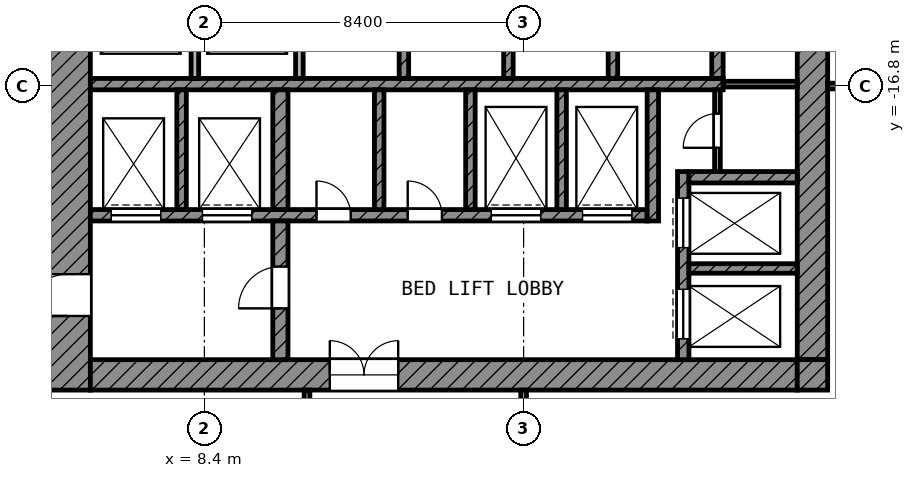
"""IFC4 building model, lengths in metres.
Left out: names, types, materials, properties, quantities, classifications, styles, units other than length and angle.
Written with IfcOpenShell. Run it as: python <this file> out.ifc"""

import sys

from ifc_helpers import new_model, si_unit, direction, frame, frame_2d, origin, place, context, subcontext, project, spatial, rectangle, extrude, element, fill, save


model = new_model("IFC4")
c1 = context("Model", 3, precision=1e-05, world=origin(), true_north=direction((0.0, 1.0)))
c2 = subcontext(c1, "Body", "Model", "MODEL_VIEW")
j1 = project(units=[si_unit("LENGTHUNIT", "METRE"), si_unit("PLANEANGLEUNIT", "RADIAN")], contexts=[c1])
p1 = place(None, origin())
s1 = spatial("IfcSite", under=j1, at=p1, CompositionType="ELEMENT")
p2 = place(p1, origin())
s2 = spatial("IfcBuilding", under=s1, at=p2, CompositionType="ELEMENT")
p3 = place(p2, frame((0.0, 0.0, 218.0)))
s3 = spatial("IfcBuildingStorey", under=s2, at=p3, CompositionType="ELEMENT", Elevation=218.0)
p4 = place(p3, frame((4.8, -24.8, 0.0), z_axis=(0.0, 0.0, 1.0), x_axis=(0.0, 1.0, 0.0)))
e1 = element("IfcWall", 1, at=p4, inside=s3, PredefinedType="SHEAR", context=c2, shape_type="SweptSolid", body=[
    extrude(rectangle(XDim=19.4, YDim=1.2, at=frame_2d((9.7, 0.0))), origin(), (0.0, 0.0, 1.0), 3.6),
])
p5 = place(p4, frame((11.25, 0.0, 0.0)))
e2 = element("IfcOpeningElement", 2, at=p5, cuts=e1, PredefinedType="OPENING", context=c2, shape_type="SweptSolid", body=[
    extrude(rectangle(XDim=1.1, YDim=2.1, at=frame_2d((0.55, 1.05))), frame((0.0, 0.61, 0.0), z_axis=(0.0, -1.0, 0.0), x_axis=(1.0, 0.0, 0.0)), (0.0, 0.0, 1.0), 1.22),
])
p6 = place(p4, frame((1.95, 0.0, 0.0)))
e3 = element("IfcOpeningElement", 3, at=p6, cuts=e1, PredefinedType="OPENING", context=c2, shape_type="SweptSolid", body=[
    extrude(rectangle(XDim=1.1, YDim=2.1, at=frame_2d((0.55, 1.05))), frame((0.0, 0.61, 0.0), z_axis=(0.0, -1.0, 0.0), x_axis=(1.0, 0.0, 0.0)), (0.0, 0.0, 1.0), 1.22),
])
p7 = place(p3, frame((24.4, -24.0, 0.0), z_axis=(0.0, 0.0, 1.0), x_axis=(0.0, 1.0, 0.0)))
e4 = element("IfcWall", 4, at=p7, inside=s3, PredefinedType="SHEAR", context=c2, shape_type="SweptSolid", body=[
    extrude(rectangle(XDim=18.6, YDim=0.8, at=frame_2d((9.3, 0.0))), origin(), (0.0, 0.0, 1.0), 3.6),
])
p8 = place(p7, frame((10.5, 0.0, 0.0)))
e5 = element("IfcOpeningElement", 5, at=p8, cuts=e4, PredefinedType="OPENING", context=c2, shape_type="SweptSolid", body=[
    extrude(rectangle(XDim=1.8, YDim=2.1, at=frame_2d((0.9, 1.05))), frame((0.0, 0.41, 0.0), z_axis=(0.0, -1.0, 0.0), x_axis=(1.0, 0.0, 0.0)), (0.0, 0.0, 1.0), 0.82),
])
p9 = place(p3, frame((5.4, -24.4, 0.0), z_axis=(0.0, 0.0, 1.0), x_axis=(1.0, 0.0, 0.0)))
e6 = element("IfcWall", 6, at=p9, inside=s3, PredefinedType="SHEAR", context=c2, shape_type="SweptSolid", body=[
    extrude(rectangle(XDim=18.6, YDim=0.8, at=frame_2d((9.3, 0.0))), origin(), (0.0, 0.0, 1.0), 3.6),
])
p10 = place(p9, frame((6.3, 0.0, 0.0)))
e7 = element("IfcOpeningElement", 7, at=p10, cuts=e6, PredefinedType="OPENING", context=c2, shape_type="SweptSolid", body=[
    extrude(rectangle(XDim=1.8, YDim=2.1, at=frame_2d((0.9, 1.05))), frame((0.0, 0.41, 0.0), z_axis=(0.0, -1.0, 0.0), x_axis=(1.0, 0.0, 0.0)), (0.0, 0.0, 1.0), 0.82),
])
p11 = place(p3, frame((24.4, -24.8, 0.0), z_axis=(0.0, 0.0, 1.0), x_axis=(0.0, 1.0, 0.0)))
e8 = element("IfcWall", 8, at=p11, inside=s3, PredefinedType="SHEAR", context=c2, shape_type="SweptSolid", body=[
    extrude(rectangle(XDim=0.8, YDim=0.8, at=frame_2d((0.4, 0.0))), origin(), (0.0, 0.0, 1.0), 3.6),
])
p12 = place(p3, frame((5.4, -16.75, 0.0), z_axis=(0.0, 0.0, 1.0), x_axis=(1.0, 0.0, 0.0)))
e9 = element("IfcWall", 9, at=p12, inside=s3, PredefinedType="SHEAR", context=c2, shape_type="SweptSolid", body=[
    extrude(rectangle(XDim=16.65, YDim=0.3, at=frame_2d((8.325, 0.0))), origin(), (0.0, 0.0, 1.0), 3.6),
])
p13 = place(p3, frame((5.4, -20.2, 0.0), z_axis=(0.0, 0.0, 1.0), x_axis=(1.0, 0.0, 0.0)))
e10 = element("IfcWall", 10, at=p13, inside=s3, PredefinedType="SHEAR", context=c2, shape_type="SweptSolid", body=[
    extrude(rectangle(XDim=14.65, YDim=0.3, at=frame_2d((7.325, 0.0))), origin(), (0.0, 0.0, 1.0), 3.6),
])
p14 = place(p13, frame((10.55, 0.0, 0.0)))
e11 = element("IfcOpeningElement", 11, at=p14, cuts=e10, PredefinedType="OPENING", context=c2, shape_type="SweptSolid", body=[
    extrude(rectangle(XDim=1.3, YDim=2.1, at=frame_2d((0.65, 1.05))), frame((0.0, 0.16, 0.0), z_axis=(0.0, -1.0, 0.0), x_axis=(1.0, 0.0, 0.0)), (0.0, 0.0, 1.0), 0.32),
])
p15 = place(p13, frame((12.95, 0.0, 0.0)))
e12 = element("IfcOpeningElement", 12, at=p15, cuts=e10, PredefinedType="OPENING", context=c2, shape_type="SweptSolid", body=[
    extrude(rectangle(XDim=1.3, YDim=2.1, at=frame_2d((0.65, 1.05))), frame((0.0, 0.16, 0.0), z_axis=(0.0, -1.0, 0.0), x_axis=(1.0, 0.0, 0.0)), (0.0, 0.0, 1.0), 0.32),
])
p16 = place(p13, frame((0.55, 0.0, 0.0)))
e13 = element("IfcOpeningElement", 13, at=p16, cuts=e10, PredefinedType="OPENING", context=c2, shape_type="SweptSolid", body=[
    extrude(rectangle(XDim=1.3, YDim=2.1, at=frame_2d((0.65, 1.05))), frame((0.0, 0.16, 0.0), z_axis=(0.0, -1.0, 0.0), x_axis=(1.0, 0.0, 0.0)), (0.0, 0.0, 1.0), 0.32),
])
p17 = place(p13, frame((2.95, 0.0, 0.0)))
e14 = element("IfcOpeningElement", 14, at=p17, cuts=e10, PredefinedType="OPENING", context=c2, shape_type="SweptSolid", body=[
    extrude(rectangle(XDim=1.3, YDim=2.1, at=frame_2d((0.65, 1.05))), frame((0.0, 0.16, 0.0), z_axis=(0.0, -1.0, 0.0), x_axis=(1.0, 0.0, 0.0)), (0.0, 0.0, 1.0), 0.32),
])
p18 = place(p13, frame((5.95, 0.0, 0.0)))
e15 = element("IfcOpeningElement", 15, at=p18, cuts=e10, PredefinedType="OPENING", context=c2, shape_type="SweptSolid", body=[
    extrude(rectangle(XDim=0.9, YDim=2.1, at=frame_2d((0.45, 1.05))), frame((0.0, 0.16, 0.0), z_axis=(0.0, -1.0, 0.0), x_axis=(1.0, 0.0, 0.0)), (0.0, 0.0, 1.0), 0.32),
])
p19 = place(p13, frame((8.35, 0.0, 0.0)))
e16 = element("IfcOpeningElement", 16, at=p19, cuts=e10, PredefinedType="OPENING", context=c2, shape_type="SweptSolid", body=[
    extrude(rectangle(XDim=0.9, YDim=2.1, at=frame_2d((0.45, 1.05))), frame((0.0, 0.16, 0.0), z_axis=(0.0, -1.0, 0.0), x_axis=(1.0, 0.0, 0.0)), (0.0, 0.0, 1.0), 0.32),
])
p20 = place(p3, frame((10.4, -24.0, 0.0), z_axis=(0.0, 0.0, 1.0), x_axis=(0.0, 1.0, 0.0)))
e17 = element("IfcWall", 17, at=p20, inside=s3, PredefinedType="SHEAR", context=c2, shape_type="SweptSolid", body=[
    extrude(rectangle(XDim=3.65, YDim=0.4, at=frame_2d((1.825, 0.0))), origin(), (0.0, 0.0, 1.0), 3.6),
])
p21 = place(p20, frame((1.35, 0.0, 0.0)))
e18 = element("IfcOpeningElement", 18, at=p21, cuts=e17, PredefinedType="OPENING", context=c2, shape_type="SweptSolid", body=[
    extrude(rectangle(XDim=1.1, YDim=2.1, at=frame_2d((0.55, 1.05))), frame((0.0, 0.21, 0.0), z_axis=(0.0, -1.0, 0.0), x_axis=(1.0, 0.0, 0.0)), (0.0, 0.0, 1.0), 0.42),
])
p22 = place(p3, frame((10.4, -20.05, 0.0), z_axis=(0.0, 0.0, 1.0), x_axis=(0.0, 1.0, 0.0)))
e19 = element("IfcWall", 19, at=p22, inside=s3, PredefinedType="SHEAR", context=c2, shape_type="SweptSolid", body=[
    extrude(rectangle(XDim=3.15, YDim=0.4, at=frame_2d((1.575, 0.0))), origin(), (0.0, 0.0, 1.0), 3.6),
])
p23 = place(p3, frame((20.2, -20.35, 0.0), z_axis=(0.0, 0.0, 1.0), x_axis=(0.0, 1.0, 0.0)))
e20 = element("IfcWall", 20, at=p23, inside=s3, PredefinedType="SHEAR", context=c2, shape_type="SweptSolid", body=[
    extrude(rectangle(XDim=3.45, YDim=0.3, at=frame_2d((1.725, 0.0))), origin(), (0.0, 0.0, 1.0), 3.6),
])
p24 = place(p3, frame((21.9, -16.6, 0.0), z_axis=(0.0, 0.0, 1.0), x_axis=(0.0, 1.0, 0.0)))
e21 = element("IfcWall", 21, at=p24, inside=s3, PredefinedType="SHEAR", context=c2, shape_type="SweptSolid", body=[
    extrude(rectangle(XDim=2.35, YDim=0.3, at=frame_2d((1.175, 0.0))), origin(), (0.0, 0.0, 1.0), 3.6),
])
p25 = place(p3, frame((21.15, -19.2, 0.0), z_axis=(0.0, 0.0, 1.0), x_axis=(1.0, 0.0, 0.0)))
e22 = element("IfcWall", 22, at=p25, inside=s3, PredefinedType="SHEAR", context=c2, shape_type="SweptSolid", body=[
    extrude(rectangle(XDim=2.85, YDim=0.3, at=frame_2d((1.425, 0.0))), origin(), (0.0, 0.0, 1.0), 3.6),
])
p26 = place(p3, frame((21.0, -24.0, 0.0), z_axis=(0.0, 0.0, 1.0), x_axis=(0.0, 1.0, 0.0)))
e23 = element("IfcWall", 23, at=p26, inside=s3, PredefinedType="SHEAR", context=c2, shape_type="SweptSolid", body=[
    extrude(rectangle(XDim=4.95, YDim=0.3, at=frame_2d((2.475, 0.0))), origin(), (0.0, 0.0, 1.0), 3.6),
])
p27 = place(p26, frame((2.95, 0.0, 0.0)))
e24 = element("IfcOpeningElement", 24, at=p27, cuts=e23, PredefinedType="OPENING", context=c2, shape_type="SweptSolid", body=[
    extrude(rectangle(XDim=1.3, YDim=2.1, at=frame_2d((0.65, 1.05))), frame((0.0, 0.16, 0.0), z_axis=(0.0, -1.0, 0.0), x_axis=(1.0, 0.0, 0.0)), (0.0, 0.0, 1.0), 0.32),
])
p28 = place(p26, frame((0.55, 0.0, 0.0)))
e25 = element("IfcOpeningElement", 25, at=p28, cuts=e23, PredefinedType="OPENING", context=c2, shape_type="SweptSolid", body=[
    extrude(rectangle(XDim=1.3, YDim=2.1, at=frame_2d((0.65, 1.05))), frame((0.0, 0.16, 0.0), z_axis=(0.0, -1.0, 0.0), x_axis=(1.0, 0.0, 0.0)), (0.0, 0.0, 1.0), 0.32),
])
p29 = place(p3, frame((21.15, -21.6, 0.0), z_axis=(0.0, 0.0, 1.0), x_axis=(1.0, 0.0, 0.0)))
e26 = element("IfcWall", 26, at=p29, inside=s3, PredefinedType="SHEAR", context=c2, shape_type="SweptSolid", body=[
    extrude(rectangle(XDim=2.85, YDim=0.25, at=frame_2d((1.425, 0.0))), origin(), (0.0, 0.0, 1.0), 3.6),
])
for number, where, z_axis, x_axis in (
    (27, (7.8, -20.05, 0.0), (0.0, 0.0, 1.0), (0.0, 1.0, 0.0)),
    (28, (13.0, -20.05, 0.0), (0.0, 0.0, 1.0), (0.0, 1.0, 0.0)),
    (29, (15.4, -20.05, 0.0), (0.0, 0.0, 1.0), (0.0, 1.0, 0.0)),
    (30, (17.8, -20.05, 0.0), (0.0, 0.0, 1.0), (0.0, 1.0, 0.0)),
):
    element("IfcWall", number, at=place(p3, frame(where, z_axis=z_axis, x_axis=x_axis)), inside=s3, PredefinedType="SHEAR", context=c2, shape_type="SweptSolid", body=[
        extrude(rectangle(XDim=3.15, YDim=0.25, at=frame_2d((1.575, 0.0))), origin(), (0.0, 0.0, 1.0), 3.6),
    ])
for number, where, z_axis, x_axis in (
    (31, (8.15, -16.6, 0.0), (0.0, 0.0, 1.0), (0.0, 1.0, 0.0)),
    (32, (10.9, -16.6, 0.0), (0.0, 0.0, 1.0), (0.0, 1.0, 0.0)),
):
    element("IfcWall", number, at=place(p3, frame(where, z_axis=z_axis, x_axis=x_axis)), inside=s3, PredefinedType="PARTITIONING", context=c2, shape_type="SweptSolid", body=[
        extrude(rectangle(XDim=2.35, YDim=0.2, at=frame_2d((1.175, 0.0))), origin(), (0.0, 0.0, 1.0), 3.6),
    ])
for number, where, z_axis, x_axis in (
    (33, (13.65, -16.6, 0.0), (0.0, 0.0, 1.0), (0.0, 1.0, 0.0)),
    (34, (16.4, -16.6, 0.0), (0.0, 0.0, 1.0), (0.0, 1.0, 0.0)),
    (35, (19.15, -16.6, 0.0), (0.0, 0.0, 1.0), (0.0, 1.0, 0.0)),
):
    element("IfcWall", number, at=place(p3, frame(where, z_axis=z_axis, x_axis=x_axis)), inside=s3, PredefinedType="SHEAR", context=c2, shape_type="SweptSolid", body=[
        extrude(rectangle(XDim=2.35, YDim=0.25, at=frame_2d((1.175, 0.0))), origin(), (0.0, 0.0, 1.0), 3.6),
    ])
p30 = place(p3, frame((21.9, -19.05, 0.0), z_axis=(0.0, 0.0, 1.0), x_axis=(0.0, 1.0, 0.0)))
e36 = element("IfcWall", 36, at=p30, inside=s3, PredefinedType="PARTITIONING", context=c2, shape_type="SweptSolid", body=[
    extrude(rectangle(XDim=2.15, YDim=0.15, at=frame_2d((1.075, 0.0))), origin(), (0.0, 0.0, 1.0), 3.6),
])
p31 = place(p30, frame((0.625, 0.0, 0.0)))
e37 = element("IfcOpeningElement", 37, at=p31, cuts=e36, PredefinedType="OPENING", context=c2, shape_type="SweptSolid", body=[
    extrude(rectangle(XDim=0.9, YDim=2.1, at=frame_2d((0.45, 1.05))), frame((0.0, 0.085, 0.0), z_axis=(0.0, -1.0, 0.0), x_axis=(1.0, 0.0, 0.0)), (0.0, 0.0, 1.0), 0.17),
])
p32 = place(p3, frame((22.05, -16.75, 0.0), z_axis=(0.0, 0.0, 1.0), x_axis=(1.0, 0.0, 0.0)))
e38 = element("IfcWall", 38, at=p32, inside=s3, PredefinedType="PARTITIONING", context=c2, shape_type="SweptSolid", body=[
    extrude(rectangle(XDim=1.95, YDim=0.15, at=frame_2d((0.975, 0.0))), origin(), (0.0, 0.0, 1.0), 3.6),
])
p33 = place(p3, frame((24.8, -16.8, 0.0), z_axis=(0.0, 0.0, 1.0), x_axis=(1.0, 0.0, 0.0)))
e39 = element("IfcWall", 39, at=p33, inside=s3, PredefinedType="PARTITIONING", context=c2, shape_type="SweptSolid", body=[
    extrude(rectangle(XDim=8.72, YDim=0.15, at=frame_2d((4.36, 0.0))), origin(), (0.0, 0.0, 1.0), 3.6),
])
p34 = place(p33, frame((1.75, 0.0, 0.0)))
e40 = element("IfcOpeningElement", 40, at=p34, cuts=e39, PredefinedType="OPENING", context=c2, shape_type="SweptSolid", body=[
    extrude(rectangle(XDim=1.5, YDim=2.1, at=frame_2d((0.75, 1.05))), frame((0.0, 0.085, 0.0), z_axis=(0.0, -1.0, 0.0), x_axis=(1.0, 0.0, 0.0)), (0.0, 0.0, 1.0), 0.17),
])
p35 = place(p33, frame((6.1, 0.0, 0.0)))
e41 = element("IfcOpeningElement", 41, at=p35, cuts=e39, PredefinedType="OPENING", context=c2, shape_type="SweptSolid", body=[
    extrude(rectangle(XDim=1.2, YDim=2.1, at=frame_2d((0.6, 1.05))), frame((0.0, 0.085, 0.0), z_axis=(0.0, -1.0, 0.0), x_axis=(1.0, 0.0, 0.0)), (0.0, 0.0, 1.0), 0.17),
])
p36 = place(p3, frame((11.1, -29.4, 0.0), z_axis=(0.0, 0.0, 1.0), x_axis=(0.0, 1.0, 0.0)))
e42 = element("IfcWall", 42, at=p36, inside=s3, PredefinedType="PARTITIONING", context=c2, shape_type="SweptSolid", body=[
    extrude(rectangle(XDim=4.6, YDim=0.15, at=frame_2d((2.3, 0.0))), origin(), (0.0, 0.0, 1.0), 3.6),
])
p37 = place(p3, frame((16.8, -46.12, 0.0), z_axis=(0.0, 0.0, 1.0), x_axis=(0.0, 1.0, 0.0)))
e43 = element("IfcWall", 43, at=p37, inside=s3, PredefinedType="PARTITIONING", context=c2, shape_type="SweptSolid", body=[
    extrude(rectangle(XDim=21.32, YDim=0.15, at=frame_2d((10.66, 0.0))), origin(), (0.0, 0.0, 1.0), 3.6),
])
p38 = place(p37, frame((18.07, 0.0, 0.0)))
e44 = element("IfcOpeningElement", 44, at=p38, cuts=e43, PredefinedType="OPENING", context=c2, shape_type="SweptSolid", body=[
    extrude(rectangle(XDim=1.5, YDim=2.1, at=frame_2d((0.75, 1.05))), frame((0.0, 0.085, 0.0), z_axis=(0.0, -1.0, 0.0), x_axis=(1.0, 0.0, 0.0)), (0.0, 0.0, 1.0), 0.17),
])
p39 = place(p37, frame((14.12, 0.0, 0.0)))
e45 = element("IfcOpeningElement", 45, at=p39, cuts=e43, PredefinedType="OPENING", context=c2, shape_type="SweptSolid", body=[
    extrude(rectangle(XDim=1.0, YDim=2.1, at=frame_2d((0.5, 1.05))), frame((0.0, 0.085, 0.0), z_axis=(0.0, -1.0, 0.0), x_axis=(1.0, 0.0, 0.0)), (0.0, 0.0, 1.0), 0.17),
])
p40 = place(p37, frame((9.77, 0.0, 0.0)))
e46 = element("IfcOpeningElement", 46, at=p40, cuts=e43, PredefinedType="OPENING", context=c2, shape_type="SweptSolid", body=[
    extrude(rectangle(XDim=1.0, YDim=2.1, at=frame_2d((0.5, 1.05))), frame((0.0, 0.085, 0.0), z_axis=(0.0, -1.0, 0.0), x_axis=(1.0, 0.0, 0.0)), (0.0, 0.0, 1.0), 0.17),
])
p41 = place(p37, frame((2.57, 0.0, 0.0)))
e47 = element("IfcOpeningElement", 47, at=p41, cuts=e43, PredefinedType="OPENING", context=c2, shape_type="SweptSolid", body=[
    extrude(rectangle(XDim=1.0, YDim=2.1, at=frame_2d((0.5, 1.05))), frame((0.0, 0.085, 0.0), z_axis=(0.0, -1.0, 0.0), x_axis=(1.0, 0.0, 0.0)), (0.0, 0.0, 1.0), 0.17),
])
p42 = place(p27, origin())
e48 = element("IfcDoor", 48, at=p42, inside=s3, OperationType="DOUBLE_DOOR_SLIDING", PredefinedType="DOOR", context=c2, shape_type="SweptSolid", body=[
    extrude(rectangle(XDim=1.3, YDim=2.1, at=frame_2d((0.65, 1.05))), frame((0.0, 0.025, 0.0), z_axis=(0.0, -1.0, 0.0), x_axis=(1.0, 0.0, 0.0)), (0.0, 0.0, 1.0), 0.05),
])
fill(e24, e48)
p43 = place(p28, origin())
e49 = element("IfcDoor", 49, at=p43, inside=s3, OperationType="DOUBLE_DOOR_SLIDING", PredefinedType="DOOR", context=c2, shape_type="SweptSolid", body=[
    extrude(rectangle(XDim=1.3, YDim=2.1, at=frame_2d((0.65, 1.05))), frame((0.0, 0.025, 0.0), z_axis=(0.0, -1.0, 0.0), x_axis=(1.0, 0.0, 0.0)), (0.0, 0.0, 1.0), 0.05),
])
fill(e25, e49)
p44 = place(p14, origin())
e50 = element("IfcDoor", 50, at=p44, inside=s3, OperationType="DOUBLE_DOOR_SLIDING", PredefinedType="DOOR", context=c2, shape_type="SweptSolid", body=[
    extrude(rectangle(XDim=1.3, YDim=2.1, at=frame_2d((0.65, 1.05))), frame((0.0, 0.025, 0.0), z_axis=(0.0, -1.0, 0.0), x_axis=(1.0, 0.0, 0.0)), (0.0, 0.0, 1.0), 0.05),
])
fill(e11, e50)
p45 = place(p15, origin())
e51 = element("IfcDoor", 51, at=p45, inside=s3, OperationType="DOUBLE_DOOR_SLIDING", PredefinedType="DOOR", context=c2, shape_type="SweptSolid", body=[
    extrude(rectangle(XDim=1.3, YDim=2.1, at=frame_2d((0.65, 1.05))), frame((0.0, 0.025, 0.0), z_axis=(0.0, -1.0, 0.0), x_axis=(1.0, 0.0, 0.0)), (0.0, 0.0, 1.0), 0.05),
])
fill(e12, e51)
p46 = place(p16, origin())
e52 = element("IfcDoor", 52, at=p46, inside=s3, OperationType="DOUBLE_DOOR_SLIDING", PredefinedType="DOOR", context=c2, shape_type="SweptSolid", body=[
    extrude(rectangle(XDim=1.3, YDim=2.1, at=frame_2d((0.65, 1.05))), frame((0.0, 0.025, 0.0), z_axis=(0.0, -1.0, 0.0), x_axis=(1.0, 0.0, 0.0)), (0.0, 0.0, 1.0), 0.05),
])
fill(e13, e52)
p47 = place(p17, origin())
e53 = element("IfcDoor", 53, at=p47, inside=s3, OperationType="DOUBLE_DOOR_SLIDING", PredefinedType="DOOR", context=c2, shape_type="SweptSolid", body=[
    extrude(rectangle(XDim=1.3, YDim=2.1, at=frame_2d((0.65, 1.05))), frame((0.0, 0.025, 0.0), z_axis=(0.0, -1.0, 0.0), x_axis=(1.0, 0.0, 0.0)), (0.0, 0.0, 1.0), 0.05),
])
fill(e14, e53)
p48 = place(p6, origin())
e54 = element("IfcDoor", 54, at=p48, inside=s3, OperationType="SINGLE_SWING_LEFT", PredefinedType="DOOR", context=c2, shape_type="SweptSolid", body=[
    extrude(rectangle(XDim=1.1, YDim=2.1, at=frame_2d((0.55, 1.05))), frame((0.0, 0.025, 0.0), z_axis=(0.0, -1.0, 0.0), x_axis=(1.0, 0.0, 0.0)), (0.0, 0.0, 1.0), 0.05),
])
fill(e3, e54)
p49 = place(p21, origin())
e55 = element("IfcDoor", 55, at=p49, inside=s3, OperationType="SINGLE_SWING_LEFT", PredefinedType="DOOR", context=c2, shape_type="SweptSolid", body=[
    extrude(rectangle(XDim=1.1, YDim=2.1, at=frame_2d((0.55, 1.05))), frame((0.0, 0.025, 0.0), z_axis=(0.0, -1.0, 0.0), x_axis=(1.0, 0.0, 0.0)), (0.0, 0.0, 1.0), 0.05),
])
fill(e18, e55)
p50 = place(p10, origin())
e56 = element("IfcDoor", 56, at=p50, inside=s3, OperationType="DOUBLE_DOOR_SINGLE_SWING", PredefinedType="DOOR", context=c2, shape_type="SweptSolid", body=[
    extrude(rectangle(XDim=1.8, YDim=2.1, at=frame_2d((0.9, 1.05))), frame((0.0, 0.025, 0.0), z_axis=(0.0, -1.0, 0.0), x_axis=(1.0, 0.0, 0.0)), (0.0, 0.0, 1.0), 0.05),
])
fill(e7, e56)
p51 = place(p31, origin())
e57 = element("IfcDoor", 57, at=p51, inside=s3, OperationType="SINGLE_SWING_LEFT", PredefinedType="DOOR", context=c2, shape_type="SweptSolid", body=[
    extrude(rectangle(XDim=0.9, YDim=2.1, at=frame_2d((0.45, 1.05))), frame((0.0, 0.025, 0.0), z_axis=(0.0, -1.0, 0.0), x_axis=(1.0, 0.0, 0.0)), (0.0, 0.0, 1.0), 0.05),
])
fill(e37, e57)
p52 = place(p18, origin())
e58 = element("IfcDoor", 58, at=p52, inside=s3, OperationType="SINGLE_SWING_LEFT", PredefinedType="DOOR", context=c2, shape_type="SweptSolid", body=[
    extrude(rectangle(XDim=0.9, YDim=2.1, at=frame_2d((0.45, 1.05))), frame((0.0, 0.025, 0.0), z_axis=(0.0, -1.0, 0.0), x_axis=(1.0, 0.0, 0.0)), (0.0, 0.0, 1.0), 0.05),
])
fill(e15, e58)
p53 = place(p19, origin())
e59 = element("IfcDoor", 59, at=p53, inside=s3, OperationType="SINGLE_SWING_LEFT", PredefinedType="DOOR", context=c2, shape_type="SweptSolid", body=[
    extrude(rectangle(XDim=0.9, YDim=2.1, at=frame_2d((0.45, 1.05))), frame((0.0, 0.025, 0.0), z_axis=(0.0, -1.0, 0.0), x_axis=(1.0, 0.0, 0.0)), (0.0, 0.0, 1.0), 0.05),
])
fill(e16, e59)
save(model, sys.argv[1])
